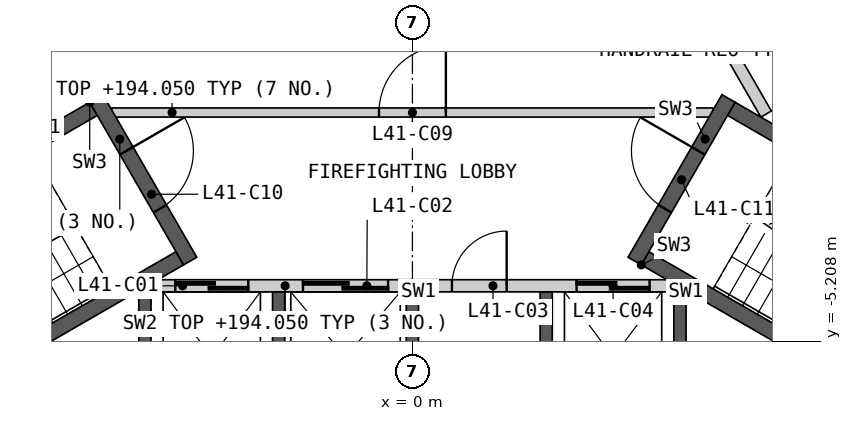
"""IFC4 building model, lengths in metres.
Left out: names, types, materials, properties, quantities, classifications, styles, units other than length and angle.
Written with IfcOpenShell. Run it as: python <this file> out.ifc"""

import sys

from ifc_helpers import new_model, si_unit, direction, frame, frame_2d, origin, place, context, subcontext, project, spatial, polyline, rectangle, outline, extrude, element, fill, save


model = new_model("IFC4")
c1 = context("Model", 3, precision=1e-05, world=origin(), true_north=direction((0.0, 1.0)))
c2 = subcontext(c1, "Body", "Model", "MODEL_VIEW")
j1 = project(units=[si_unit("LENGTHUNIT", "METRE"), si_unit("PLANEANGLEUNIT", "RADIAN")], contexts=[c1])
p1 = place(None, origin())
s1 = spatial("IfcSite", under=j1, at=p1, CompositionType="ELEMENT")
p2 = place(p1, origin())
s2 = spatial("IfcBuilding", under=s1, at=p2, CompositionType="ELEMENT")
p3 = place(p2, frame((0.0, 0.0, 190.8)))
s3 = spatial("IfcBuildingStorey", under=s2, at=p3, CompositionType="ELEMENT", Elevation=190.8)
p4 = place(p3, origin())
e1 = element("IfcWall", 1, at=p4, inside=s3, PredefinedType="SHEAR", context=c2, shape_type="SweptSolid", body=[
    extrude(outline(polyline([(4.5, -4.4), (4.5, -6.906), (2.1, -6.906), (2.1, -4.4), (2.3, -4.4), (2.3, -6.7), (4.3, -6.7), (4.3, -4.4), (4.5, -4.4)])), origin(), (0.0, 0.0, 1.0), 3.25),
])
p5 = place(p3, origin())
e2 = element("IfcWall", 2, at=p5, inside=s3, PredefinedType="SHEAR", context=c2, shape_type="SweptSolid", body=[
    extrude(outline(polyline([(0.1, -4.4), (0.1, -6.906), (-4.5, -6.906), (-4.5, -4.4), (-4.3, -4.4), (-4.3, -6.7), (-2.3, -6.7), (-2.3, -4.4), (-2.1, -4.4), (-2.1, -6.7), (-0.1, -6.7), (-0.1, -4.4), (0.1, -4.4)])), origin(), (0.0, 0.0, 1.0), 3.25),
])
p6 = place(p3, frame((-4.187, -4.3, 0.0), z_axis=(0.0, 0.0, 1.0), x_axis=(1.0, 0.0, 0.0)))
e3 = element("IfcWall", 3, at=p6, inside=s3, PredefinedType="SOLIDWALL", context=c2, shape_type="SweptSolid", body=[
    extrude(rectangle(XDim=8.373, YDim=0.2, at=frame_2d((4.187, 0.0))), origin(), (0.0, 0.0, 1.0), 3.25),
])
p7 = place(p6, frame((0.287, 0.0, 0.0)))
e4 = element("IfcOpeningElement", 4, at=p7, cuts=e3, PredefinedType="OPENING", context=c2, shape_type="SweptSolid", body=[
    extrude(rectangle(XDim=1.2, YDim=2.1, at=frame_2d((0.6, 1.05))), frame((0.0, 0.11, 0.0), z_axis=(0.0, -1.0, 0.0), x_axis=(1.0, 0.0, 0.0)), (0.0, 0.0, 1.0), 0.22),
])
p8 = place(p6, frame((2.387, 0.0, 0.0)))
e5 = element("IfcOpeningElement", 5, at=p8, cuts=e3, PredefinedType="OPENING", context=c2, shape_type="SweptSolid", body=[
    extrude(rectangle(XDim=1.4, YDim=2.1, at=frame_2d((0.7, 1.05))), frame((0.0, 0.11, 0.0), z_axis=(0.0, -1.0, 0.0), x_axis=(1.0, 0.0, 0.0)), (0.0, 0.0, 1.0), 0.22),
])
p9 = place(p6, frame((4.837, 0.0, 0.0)))
e6 = element("IfcOpeningElement", 6, at=p9, cuts=e3, PredefinedType="OPENING", context=c2, shape_type="SweptSolid", body=[
    extrude(rectangle(XDim=0.9, YDim=2.1, at=frame_2d((0.45, 1.05))), frame((0.0, 0.11, 0.0), z_axis=(0.0, -1.0, 0.0), x_axis=(1.0, 0.0, 0.0)), (0.0, 0.0, 1.0), 0.22),
])
p10 = place(p6, frame((6.887, 0.0, 0.0)))
e7 = element("IfcOpeningElement", 7, at=p10, cuts=e3, PredefinedType="OPENING", context=c2, shape_type="SweptSolid", body=[
    extrude(rectangle(XDim=1.2, YDim=2.1, at=frame_2d((0.6, 1.05))), frame((0.0, 0.11, 0.0), z_axis=(0.0, -1.0, 0.0), x_axis=(1.0, 0.0, 0.0)), (0.0, 0.0, 1.0), 0.22),
])
p11 = place(p3, origin())
e8 = element("IfcWall", 8, at=p11, inside=s3, PredefinedType="SHEAR", context=c2, shape_type="SweptSolid", body=[
    extrude(outline(polyline([(1.561, 6.097), (3.731, 7.35), (8.231, -0.444), (6.061, -1.697), (5.96, -1.524), (7.952, -0.374), (4.752, 5.169), (2.76, 4.019), (2.66, 4.192), (4.652, 5.342), (3.652, 7.074), (1.66, 5.924), (1.561, 6.097)])), origin(), (0.0, 0.0, 1.0), 3.25),
])
p12 = place(p3, frame((5.817, -1.476, 0.0), z_axis=(0.0, 0.0, 1.0), x_axis=(-0.500002616675, 0.866023893041, 0.0)))
e9 = element("IfcWall", 9, at=p12, inside=s3, PredefinedType="SOLIDWALL", context=c2, shape_type="SweptSolid", body=[
    extrude(rectangle(XDim=8.373, YDim=0.2, at=frame_2d((4.187, 0.0))), origin(), (0.0, 0.0, 1.0), 3.25),
])
p13 = place(p12, frame((2.637, 0.0, 0.0)))
e10 = element("IfcOpeningElement", 10, at=p13, cuts=e9, PredefinedType="OPENING", context=c2, shape_type="SweptSolid", body=[
    extrude(rectangle(XDim=0.9, YDim=2.1, at=frame_2d((0.45, 1.05))), frame((0.0, 0.11, 0.0), z_axis=(0.0, -1.0, 0.0), x_axis=(1.0, 0.0, 0.0)), (0.0, 0.0, 1.0), 0.22),
])
p14 = place(p12, frame((6.937, 0.0, 0.0)))
e11 = element("IfcOpeningElement", 11, at=p14, cuts=e9, PredefinedType="OPENING", context=c2, shape_type="SweptSolid", body=[
    extrude(rectangle(XDim=1.1, YDim=2.1, at=frame_2d((0.55, 1.05))), frame((0.0, 0.11, 0.0), z_axis=(0.0, -1.0, 0.0), x_axis=(1.0, 0.0, 0.0)), (0.0, 0.0, 1.0), 0.22),
])
p15 = place(p3, frame((-4.941, -1.45, 0.0), z_axis=(0.0, 0.0, 1.0), x_axis=(1.0, 0.0, 0.0)))
e12 = element("IfcWall", 12, at=p15, inside=s3, PredefinedType="PARTITIONING", context=c2, shape_type="SweptSolid", body=[
    extrude(rectangle(XDim=9.882, YDim=0.15, at=frame_2d((4.941, 0.0))), origin(), (0.0, 0.0, 1.0), 3.25),
])
p16 = place(p15, frame((4.391, 0.0, 0.0)))
e13 = element("IfcOpeningElement", 13, at=p16, cuts=e12, PredefinedType="OPENING", context=c2, shape_type="SweptSolid", body=[
    extrude(rectangle(XDim=1.1, YDim=2.1, at=frame_2d((0.55, 1.05))), frame((0.0, 0.085, 0.0), z_axis=(0.0, -1.0, 0.0), x_axis=(1.0, 0.0, 0.0)), (0.0, 0.0, 1.0), 0.17),
])
p17 = place(p3, origin())
e14 = element("IfcWall", 14, at=p17, inside=s3, PredefinedType="SHEAR", context=c2, shape_type="SweptSolid", body=[
    extrude(outline(polyline([(-5.307, -1.281), (-10.374, -4.206), (-10.032, -4.298), (-5.182, -1.498), (-5.307, -1.281)])), origin(), (0.0, 0.0, 1.0), 3.25),
])
p18 = place(p3, origin())
e15 = element("IfcWall", 15, at=p18, inside=s3, PredefinedType="SHEAR", context=c2, shape_type="SweptSolid", body=[
    extrude(outline(polyline([(-8.738, -6.539), (-8.83, -6.881), (-3.763, -3.956), (-3.888, -3.739), (-8.738, -6.539)])), origin(), (0.0, 0.0, 1.0), 3.25),
])
p19 = place(p3, frame((-5.199, -1.219, 0.0), z_axis=(0.0, 0.0, 1.0), x_axis=(0.499982516597, -0.866035497597, 0.0)))
e16 = element("IfcWall", 16, at=p19, inside=s3, PredefinedType="SHEAR", context=c2, shape_type="SweptSolid", body=[
    extrude(rectangle(XDim=3.088, YDim=0.25, at=frame_2d((1.544, 0.0))), origin(), (0.0, 0.0, 1.0), 3.25),
])
p20 = place(p19, frame((0.994, 0.0, 0.0)))
e17 = element("IfcOpeningElement", 17, at=p20, cuts=e16, PredefinedType="OPENING", context=c2, shape_type="SweptSolid", body=[
    extrude(rectangle(XDim=1.1, YDim=2.1, at=frame_2d((0.55, 1.05))), frame((0.0, 0.135, 0.0), z_axis=(0.0, -1.0, 0.0), x_axis=(1.0, 0.0, 0.0)), (0.0, 0.0, 1.0), 0.27),
])
p21 = place(p3, origin())
e18 = element("IfcWall", 18, at=p21, inside=s3, PredefinedType="SHEAR", context=c2, shape_type="SweptSolid", body=[
    extrude(outline(polyline([(3.763, -3.956), (8.83, -6.881), (8.738, -6.539), (3.888, -3.739), (3.763, -3.956)])), origin(), (0.0, 0.0, 1.0), 3.25),
])
p22 = place(p3, origin())
e19 = element("IfcWall", 19, at=p22, inside=s3, PredefinedType="SHEAR", context=c2, shape_type="SweptSolid", body=[
    extrude(outline(polyline([(10.032, -4.298), (10.374, -4.206), (5.307, -1.281), (5.182, -1.498), (10.032, -4.298)])), origin(), (0.0, 0.0, 1.0), 3.25),
])
p23 = place(p3, frame((3.655, -3.893, 0.0), z_axis=(0.0, 0.0, 1.0), x_axis=(0.499982516597, 0.866035497597, 0.0)))
e20 = element("IfcWall", 20, at=p23, inside=s3, PredefinedType="SHEAR", context=c2, shape_type="SweptSolid", body=[
    extrude(rectangle(XDim=3.088, YDim=0.25, at=frame_2d((1.544, 0.0))), origin(), (0.0, 0.0, 1.0), 3.25),
])
p24 = place(p23, frame((0.994, 0.0, 0.0)))
e21 = element("IfcOpeningElement", 21, at=p24, cuts=e20, PredefinedType="OPENING", context=c2, shape_type="SweptSolid", body=[
    extrude(rectangle(XDim=1.1, YDim=2.1, at=frame_2d((0.55, 1.05))), frame((0.0, 0.135, 0.0), z_axis=(0.0, -1.0, 0.0), x_axis=(1.0, 0.0, 0.0)), (0.0, 0.0, 1.0), 0.27),
])
p25 = place(p3, frame((-19.476, -5.035, 0.0), z_axis=(0.0, 0.0, 1.0), x_axis=(0.500000757641, 0.86602496636, 0.0)))
e22 = element("IfcWall", 22, at=p25, inside=s3, PredefinedType="PARTITIONING", context=c2, shape_type="SweptSolid", body=[
    extrude(rectangle(XDim=28.198, YDim=0.2, at=frame_2d((14.099, 0.0))), origin(), (0.0, 0.0, 1.0), 3.25),
])
p26 = place(p25, frame((25.796, 0.0, 0.0)))
e23 = element("IfcOpeningElement", 23, at=p26, cuts=e22, PredefinedType="OPENING", context=c2, shape_type="SweptSolid", body=[
    extrude(rectangle(XDim=0.95, YDim=2.1, at=frame_2d((0.475, 1.05))), frame((0.0, 0.11, 0.0), z_axis=(0.0, -1.0, 0.0), x_axis=(1.0, 0.0, 0.0)), (0.0, 0.0, 1.0), 0.22),
])
p27 = place(p25, frame((14.603, 0.0, 0.0)))
e24 = element("IfcOpeningElement", 24, at=p27, cuts=e22, PredefinedType="OPENING", context=c2, shape_type="SweptSolid", body=[
    extrude(rectangle(XDim=1.1, YDim=2.1, at=frame_2d((0.55, 1.05))), frame((0.0, 0.11, 0.0), z_axis=(0.0, -1.0, 0.0), x_axis=(1.0, 0.0, 0.0)), (0.0, 0.0, 1.0), 0.22),
])
p28 = place(p25, frame((11.993, 0.0, 0.0)))
e25 = element("IfcOpeningElement", 25, at=p28, cuts=e22, PredefinedType="OPENING", context=c2, shape_type="SweptSolid", body=[
    extrude(rectangle(XDim=1.1, YDim=2.1, at=frame_2d((0.55, 1.05))), frame((0.0, 0.11, 0.0), z_axis=(0.0, -1.0, 0.0), x_axis=(1.0, 0.0, 0.0)), (0.0, 0.0, 1.0), 0.22),
])
p29 = place(p25, frame((1.452, 0.0, 0.0)))
e26 = element("IfcOpeningElement", 26, at=p29, cuts=e22, PredefinedType="OPENING", context=c2, shape_type="SweptSolid", body=[
    extrude(rectangle(XDim=0.95, YDim=2.1, at=frame_2d((0.475, 1.05))), frame((0.0, 0.11, 0.0), z_axis=(0.0, -1.0, 0.0), x_axis=(1.0, 0.0, 0.0)), (0.0, 0.0, 1.0), 0.22),
])
p30 = place(p7, origin())
e27 = element("IfcDoor", 27, at=p30, inside=s3, OperationType="SLIDING_TO_LEFT", PredefinedType="DOOR", context=c2, shape_type="SweptSolid", body=[
    extrude(rectangle(XDim=1.2, YDim=2.1, at=frame_2d((0.6, 1.05))), frame((0.0, 0.025, 0.0), z_axis=(0.0, -1.0, 0.0), x_axis=(1.0, 0.0, 0.0)), (0.0, 0.0, 1.0), 0.05),
])
fill(e4, e27)
p31 = place(p8, origin())
e28 = element("IfcDoor", 28, at=p31, inside=s3, OperationType="SLIDING_TO_LEFT", PredefinedType="DOOR", context=c2, shape_type="SweptSolid", body=[
    extrude(rectangle(XDim=1.4, YDim=2.1, at=frame_2d((0.7, 1.05))), frame((0.0, 0.025, 0.0), z_axis=(0.0, -1.0, 0.0), x_axis=(1.0, 0.0, 0.0)), (0.0, 0.0, 1.0), 0.05),
])
fill(e5, e28)
p32 = place(p9, origin())
e29 = element("IfcDoor", 29, at=p32, inside=s3, OperationType="SINGLE_SWING_RIGHT", PredefinedType="DOOR", context=c2, shape_type="SweptSolid", body=[
    extrude(rectangle(XDim=0.9, YDim=2.1, at=frame_2d((0.45, 1.05))), frame((0.0, 0.025, 0.0), z_axis=(0.0, -1.0, 0.0), x_axis=(1.0, 0.0, 0.0)), (0.0, 0.0, 1.0), 0.05),
])
fill(e6, e29)
p33 = place(p10, origin())
e30 = element("IfcDoor", 30, at=p33, inside=s3, OperationType="SLIDING_TO_LEFT", PredefinedType="DOOR", context=c2, shape_type="SweptSolid", body=[
    extrude(rectangle(XDim=1.2, YDim=2.1, at=frame_2d((0.6, 1.05))), frame((0.0, 0.025, 0.0), z_axis=(0.0, -1.0, 0.0), x_axis=(1.0, 0.0, 0.0)), (0.0, 0.0, 1.0), 0.05),
])
fill(e7, e30)
p34 = place(p16, origin())
e31 = element("IfcDoor", 31, at=p34, inside=s3, OperationType="SINGLE_SWING_RIGHT", PredefinedType="DOOR", context=c2, shape_type="SweptSolid", body=[
    extrude(rectangle(XDim=1.1, YDim=2.1, at=frame_2d((0.55, 1.05))), frame((0.0, 0.025, 0.0), z_axis=(0.0, -1.0, 0.0), x_axis=(1.0, 0.0, 0.0)), (0.0, 0.0, 1.0), 0.05),
])
fill(e13, e31)
p35 = place(p20, origin())
e32 = element("IfcDoor", 32, at=p35, inside=s3, OperationType="SINGLE_SWING_LEFT", PredefinedType="DOOR", context=c2, shape_type="SweptSolid", body=[
    extrude(rectangle(XDim=1.1, YDim=2.1, at=frame_2d((0.55, 1.05))), frame((0.0, 0.025, 0.0), z_axis=(0.0, -1.0, 0.0), x_axis=(1.0, 0.0, 0.0)), (0.0, 0.0, 1.0), 0.05),
])
fill(e17, e32)
p36 = place(p24, origin())
e33 = element("IfcDoor", 33, at=p36, inside=s3, OperationType="SINGLE_SWING_RIGHT", PredefinedType="DOOR", context=c2, shape_type="SweptSolid", body=[
    extrude(rectangle(XDim=1.1, YDim=2.1, at=frame_2d((0.55, 1.05))), frame((0.0, 0.025, 0.0), z_axis=(0.0, -1.0, 0.0), x_axis=(1.0, 0.0, 0.0)), (0.0, 0.0, 1.0), 0.05),
])
fill(e21, e33)
save(model, sys.argv[1])
